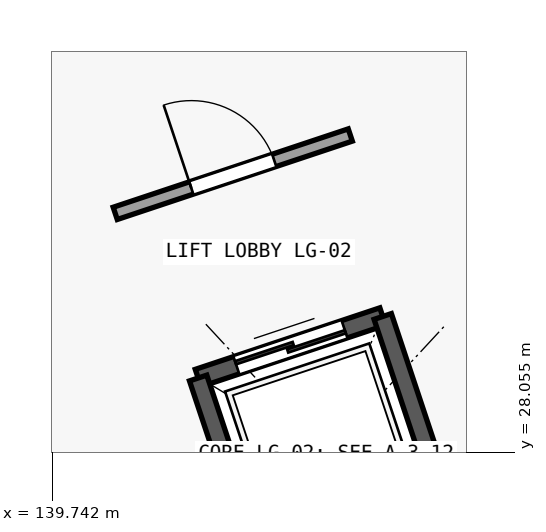
"""IFC4 building model, lengths in metres.
Left out: names, types, materials, properties, quantities, classifications, styles, units other than length and angle.
Written with IfcOpenShell. Run it as: python <this file> out.ifc"""

import sys

from ifc_helpers import new_model, si_unit, direction, frame, frame_2d, origin, place, context, subcontext, project, spatial, rectangle, extrude, element, fill, save


model = new_model("IFC4")
c1 = context("Model", 3, precision=1e-05, world=origin(), true_north=direction((0.0, 1.0)))
c2 = subcontext(c1, "Body", "Model", "MODEL_VIEW")
j1 = project(units=[si_unit("LENGTHUNIT", "METRE"), si_unit("PLANEANGLEUNIT", "RADIAN")], contexts=[c1])
p1 = place(None, origin())
s1 = spatial("IfcSite", under=j1, at=p1, CompositionType="ELEMENT")
p2 = place(p1, origin())
s2 = spatial("IfcBuilding", under=s1, at=p2, CompositionType="ELEMENT")
p3 = place(p2, frame((0.0, 0.0, 9.9)))
s3 = spatial("IfcBuildingStorey", under=s2, at=p3, CompositionType="ELEMENT", Elevation=9.9)
p4 = place(p3, frame((141.664, 29.032, 0.0), z_axis=(0.0, 0.0, 1.0), x_axis=(0.948673760334, 0.316256377729, 0.0)))
e1 = element("IfcWall", 1, at=p4, inside=s3, PredefinedType="SOLIDWALL", context=c2, shape_type="SweptSolid", body=[
    extrude(rectangle(XDim=2.56, YDim=0.24, at=frame_2d((1.28, 0.0))), origin(), (0.0, 0.0, 1.0), 3.94),
])
p5 = place(p4, frame((0.53, 0.0, 0.0)))
e2 = element("IfcOpeningElement", 2, at=p5, cuts=e1, PredefinedType="OPENING", context=c2, shape_type="SweptSolid", body=[
    extrude(rectangle(XDim=1.5, YDim=2.25, at=frame_2d((0.75, 1.125))), frame((0.0, 0.13, 0.0), z_axis=(0.0, -1.0, 0.0), x_axis=(1.0, 0.0, 0.0)), (0.0, 0.0, 1.0), 0.26),
])
for number, where, z_axis, x_axis in (
    (3, (142.6, 26.224, 0.0), (0.0, 0.0, 1.0), (-0.316, 0.949, 0.0)),
    (4, (144.093, 29.842, 0.0), (0.0, 0.0, 1.0), (0.316, -0.949, 0.0)),
):
    element("IfcWall", number, at=place(p3, frame(where, z_axis=z_axis, x_axis=x_axis)), inside=s3, PredefinedType="SOLIDWALL", context=c2, shape_type="SweptSolid", body=[
        extrude(rectangle(XDim=2.96, YDim=0.24, at=frame_2d((1.48, 0.0))), origin(), (0.0, 0.0, 1.0), 3.94),
    ])
p6 = place(p3, frame((140.573, 31.198, 0.0), z_axis=(0.0, 0.0, 1.0), x_axis=(0.948698274856, 0.316182832053, 0.0)))
e5 = element("IfcWall", 5, at=p6, inside=s3, PredefinedType="PARTITIONING", context=c2, shape_type="SweptSolid", body=[
    extrude(rectangle(XDim=3.26, YDim=0.17, at=frame_2d((1.63, 0.0))), origin(), (0.0, 0.0, 1.0), 3.94),
])
p7 = place(p6, frame((1.055, 0.0, 0.0)))
e6 = element("IfcOpeningElement", 6, at=p7, cuts=e5, PredefinedType="OPENING", context=c2, shape_type="SweptSolid", body=[
    extrude(rectangle(XDim=1.15, YDim=2.15, at=frame_2d((0.575, 1.075))), frame((0.0, 0.095, 0.0), z_axis=(0.0, -1.0, 0.0), x_axis=(1.0, 0.0, 0.0)), (0.0, 0.0, 1.0), 0.19),
])
p8 = place(p3, frame((121.299, 29.981, 0.0), z_axis=(0.0, 0.0, 1.0), x_axis=(0.948683298051, 0.316227766017, 0.0)))
e7 = element("IfcWall", 7, at=p8, inside=s3, PredefinedType="PARTITIONING", context=c2, shape_type="SweptSolid", body=[
    extrude(rectangle(XDim=24.3, YDim=0.15, at=frame_2d((12.15, 0.0))), origin(), (0.0, 0.0, 1.0), 3.64),
])
p9 = place(p8, frame((10.147, 0.0, 0.0)))
e8 = element("IfcOpeningElement", 8, at=p9, cuts=e7, PredefinedType="OPENING", context=c2, shape_type="SweptSolid", body=[
    extrude(rectangle(XDim=1.75, YDim=2.25, at=frame_2d((0.875, 1.125))), frame((0.0, 0.085, 0.0), z_axis=(0.0, -1.0, 0.0), x_axis=(1.0, 0.0, 0.0)), (0.0, 0.0, 1.0), 0.17),
])
p10 = place(p5, origin())
e9 = element("IfcDoor", 9, at=p10, inside=s3, OperationType="DOUBLE_DOOR_SLIDING", PredefinedType="DOOR", context=c2, shape_type="SweptSolid", body=[
    extrude(rectangle(XDim=1.5, YDim=2.25, at=frame_2d((0.75, 1.125))), frame((0.0, 0.025, 0.0), z_axis=(0.0, -1.0, 0.0), x_axis=(1.0, 0.0, 0.0)), (0.0, 0.0, 1.0), 0.05),
])
fill(e2, e9)
p11 = place(p7, origin())
e10 = element("IfcDoor", 10, at=p11, inside=s3, OperationType="SINGLE_SWING_LEFT", PredefinedType="DOOR", context=c2, shape_type="SweptSolid", body=[
    extrude(rectangle(XDim=1.15, YDim=2.15, at=frame_2d((0.575, 1.075))), frame((0.0, 0.025, 0.0), z_axis=(0.0, -1.0, 0.0), x_axis=(1.0, 0.0, 0.0)), (0.0, 0.0, 1.0), 0.05),
])
fill(e6, e10)
save(model, sys.argv[1])
